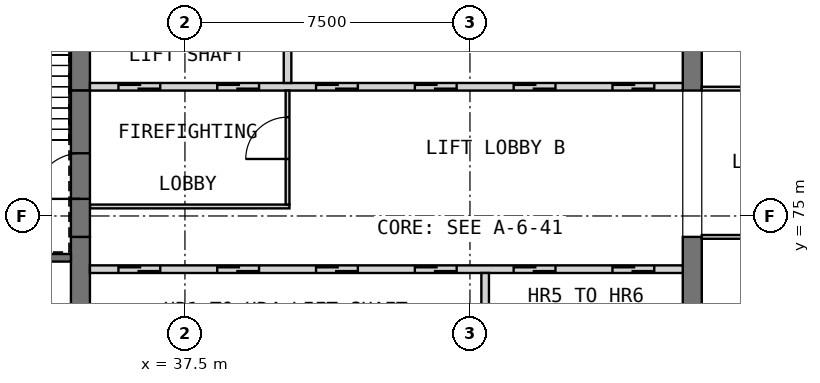
"""IFC4 building model, lengths in metres.
Left out: names, types, materials, properties, quantities, classifications, styles, units other than length and angle.
Written with IfcOpenShell. Run it as: python <this file> out.ifc"""

import sys

from ifc_helpers import new_model, si_unit, direction, frame, frame_2d, origin, place, context, subcontext, project, spatial, rectangle, extrude, element, fill, save


model = new_model("IFC4")
c1 = context("Model", 3, precision=1e-05, world=origin(), true_north=direction((0.0, 1.0)))
c2 = subcontext(c1, "Body", "Model", "MODEL_VIEW")
j1 = project(units=[si_unit("LENGTHUNIT", "METRE"), si_unit("PLANEANGLEUNIT", "RADIAN")], contexts=[c1])
p1 = place(None, origin())
s1 = spatial("IfcSite", under=j1, at=p1, CompositionType="ELEMENT")
p2 = place(p1, origin())
s2 = spatial("IfcBuilding", under=s1, at=p2, CompositionType="ELEMENT")
p3 = place(p2, frame((0.0, 0.0, 302.7)))
s3 = spatial("IfcBuildingStorey", under=s2, at=p3, CompositionType="ELEMENT", Elevation=302.7)
p4 = place(p3, frame((34.75, 68.05, 0.0), z_axis=(0.0, 0.0, 1.0), x_axis=(0.0, 1.0, 0.0)))
e1 = element("IfcWall", 1, at=p4, inside=s3, PredefinedType="SHEAR", context=c2, shape_type="SweptSolid", body=[
    extrude(rectangle(XDim=6.4, YDim=0.5, at=frame_2d((3.2, 0.0))), origin(), (0.0, 0.0, 1.0), 6.0),
])
p5 = place(p3, frame((34.75, 78.3, 0.0), z_axis=(0.0, 0.0, 1.0), x_axis=(0.0, 1.0, 0.0)))
e2 = element("IfcWall", 2, at=p5, inside=s3, PredefinedType="SHEAR", context=c2, shape_type="SweptSolid", body=[
    extrude(rectangle(XDim=3.6, YDim=0.5, at=frame_2d((1.8, 0.0))), origin(), (0.0, 0.0, 1.0), 6.0),
])
p6 = place(p3, frame((50.85, 68.05, 0.0), z_axis=(0.0, 0.0, 1.0), x_axis=(0.0, 1.0, 0.0)))
e3 = element("IfcWall", 3, at=p6, inside=s3, PredefinedType="SHEAR", context=c2, shape_type="SweptSolid", body=[
    extrude(rectangle(XDim=6.4, YDim=0.5, at=frame_2d((3.2, 0.0))), origin(), (0.0, 0.0, 1.0), 6.0),
])
p7 = place(p3, frame((50.85, 78.3, 0.0), z_axis=(0.0, 0.0, 1.0), x_axis=(0.0, 1.0, 0.0)))
e4 = element("IfcWall", 4, at=p7, inside=s3, PredefinedType="SHEAR", context=c2, shape_type="SweptSolid", body=[
    extrude(rectangle(XDim=3.6, YDim=0.5, at=frame_2d((1.8, 0.0))), origin(), (0.0, 0.0, 1.0), 6.0),
])
p8 = place(p3, frame((35.0, 73.6, 0.0), z_axis=(0.0, 0.0, 1.0), x_axis=(1.0, 0.0, 0.0)))
e5 = element("IfcWall", 5, at=p8, inside=s3, PredefinedType="SOLIDWALL", context=c2, shape_type="SweptSolid", body=[
    extrude(rectangle(XDim=15.6, YDim=0.2, at=frame_2d((7.8, 0.0))), origin(), (0.0, 0.0, 1.0), 6.0),
])
p9 = place(p8, frame((0.75, 0.0, 0.0)))
e6 = element("IfcOpeningElement", 6, at=p9, cuts=e5, PredefinedType="OPENING", context=c2, shape_type="SweptSolid", body=[
    extrude(rectangle(XDim=1.1, YDim=2.1, at=frame_2d((0.55, 1.05))), frame((0.0, 0.11, 0.0), z_axis=(0.0, -1.0, 0.0), x_axis=(1.0, 0.0, 0.0)), (0.0, 0.0, 1.0), 0.22),
])
p10 = place(p8, frame((3.35, 0.0, 0.0)))
e7 = element("IfcOpeningElement", 7, at=p10, cuts=e5, PredefinedType="OPENING", context=c2, shape_type="SweptSolid", body=[
    extrude(rectangle(XDim=1.1, YDim=2.1, at=frame_2d((0.55, 1.05))), frame((0.0, 0.11, 0.0), z_axis=(0.0, -1.0, 0.0), x_axis=(1.0, 0.0, 0.0)), (0.0, 0.0, 1.0), 0.22),
])
p11 = place(p8, frame((5.95, 0.0, 0.0)))
e8 = element("IfcOpeningElement", 8, at=p11, cuts=e5, PredefinedType="OPENING", context=c2, shape_type="SweptSolid", body=[
    extrude(rectangle(XDim=1.1, YDim=2.1, at=frame_2d((0.55, 1.05))), frame((0.0, 0.11, 0.0), z_axis=(0.0, -1.0, 0.0), x_axis=(1.0, 0.0, 0.0)), (0.0, 0.0, 1.0), 0.22),
])
p12 = place(p8, frame((8.55, 0.0, 0.0)))
e9 = element("IfcOpeningElement", 9, at=p12, cuts=e5, PredefinedType="OPENING", context=c2, shape_type="SweptSolid", body=[
    extrude(rectangle(XDim=1.1, YDim=2.1, at=frame_2d((0.55, 1.05))), frame((0.0, 0.11, 0.0), z_axis=(0.0, -1.0, 0.0), x_axis=(1.0, 0.0, 0.0)), (0.0, 0.0, 1.0), 0.22),
])
p13 = place(p8, frame((11.15, 0.0, 0.0)))
e10 = element("IfcOpeningElement", 10, at=p13, cuts=e5, PredefinedType="OPENING", context=c2, shape_type="SweptSolid", body=[
    extrude(rectangle(XDim=1.1, YDim=2.1, at=frame_2d((0.55, 1.05))), frame((0.0, 0.11, 0.0), z_axis=(0.0, -1.0, 0.0), x_axis=(1.0, 0.0, 0.0)), (0.0, 0.0, 1.0), 0.22),
])
p14 = place(p8, frame((13.75, 0.0, 0.0)))
e11 = element("IfcOpeningElement", 11, at=p14, cuts=e5, PredefinedType="OPENING", context=c2, shape_type="SweptSolid", body=[
    extrude(rectangle(XDim=1.1, YDim=2.1, at=frame_2d((0.55, 1.05))), frame((0.0, 0.11, 0.0), z_axis=(0.0, -1.0, 0.0), x_axis=(1.0, 0.0, 0.0)), (0.0, 0.0, 1.0), 0.22),
])
p15 = place(p3, frame((45.4, 71.5, 0.0), z_axis=(0.0, 0.0, 1.0), x_axis=(0.0, 1.0, 0.0)))
e12 = element("IfcWall", 12, at=p15, inside=s3, PredefinedType="SOLIDWALL", context=c2, shape_type="SweptSolid", body=[
    extrude(rectangle(XDim=2.0, YDim=0.2, at=frame_2d((1.0, 0.0))), origin(), (0.0, 0.0, 1.0), 6.0),
])
p16 = place(p3, frame((35.0, 78.4, 0.0), z_axis=(0.0, 0.0, 1.0), x_axis=(1.0, 0.0, 0.0)))
e13 = element("IfcWall", 13, at=p16, inside=s3, PredefinedType="SOLIDWALL", context=c2, shape_type="SweptSolid", body=[
    extrude(rectangle(XDim=15.6, YDim=0.2, at=frame_2d((7.8, 0.0))), origin(), (0.0, 0.0, 1.0), 6.0),
])
p17 = place(p16, frame((0.75, 0.0, 0.0)))
e14 = element("IfcOpeningElement", 14, at=p17, cuts=e13, PredefinedType="OPENING", context=c2, shape_type="SweptSolid", body=[
    extrude(rectangle(XDim=1.1, YDim=2.1, at=frame_2d((0.55, 1.05))), frame((0.0, 0.11, 0.0), z_axis=(0.0, -1.0, 0.0), x_axis=(1.0, 0.0, 0.0)), (0.0, 0.0, 1.0), 0.22),
])
p18 = place(p16, frame((3.35, 0.0, 0.0)))
e15 = element("IfcOpeningElement", 15, at=p18, cuts=e13, PredefinedType="OPENING", context=c2, shape_type="SweptSolid", body=[
    extrude(rectangle(XDim=1.1, YDim=2.1, at=frame_2d((0.55, 1.05))), frame((0.0, 0.11, 0.0), z_axis=(0.0, -1.0, 0.0), x_axis=(1.0, 0.0, 0.0)), (0.0, 0.0, 1.0), 0.22),
])
p19 = place(p16, frame((5.95, 0.0, 0.0)))
e16 = element("IfcOpeningElement", 16, at=p19, cuts=e13, PredefinedType="OPENING", context=c2, shape_type="SweptSolid", body=[
    extrude(rectangle(XDim=1.1, YDim=2.1, at=frame_2d((0.55, 1.05))), frame((0.0, 0.11, 0.0), z_axis=(0.0, -1.0, 0.0), x_axis=(1.0, 0.0, 0.0)), (0.0, 0.0, 1.0), 0.22),
])
p20 = place(p16, frame((8.55, 0.0, 0.0)))
e17 = element("IfcOpeningElement", 17, at=p20, cuts=e13, PredefinedType="OPENING", context=c2, shape_type="SweptSolid", body=[
    extrude(rectangle(XDim=1.1, YDim=2.1, at=frame_2d((0.55, 1.05))), frame((0.0, 0.11, 0.0), z_axis=(0.0, -1.0, 0.0), x_axis=(1.0, 0.0, 0.0)), (0.0, 0.0, 1.0), 0.22),
])
p21 = place(p16, frame((11.15, 0.0, 0.0)))
e18 = element("IfcOpeningElement", 18, at=p21, cuts=e13, PredefinedType="OPENING", context=c2, shape_type="SweptSolid", body=[
    extrude(rectangle(XDim=1.1, YDim=2.1, at=frame_2d((0.55, 1.05))), frame((0.0, 0.11, 0.0), z_axis=(0.0, -1.0, 0.0), x_axis=(1.0, 0.0, 0.0)), (0.0, 0.0, 1.0), 0.22),
])
p22 = place(p16, frame((13.75, 0.0, 0.0)))
e19 = element("IfcOpeningElement", 19, at=p22, cuts=e13, PredefinedType="OPENING", context=c2, shape_type="SweptSolid", body=[
    extrude(rectangle(XDim=1.1, YDim=2.1, at=frame_2d((0.55, 1.05))), frame((0.0, 0.11, 0.0), z_axis=(0.0, -1.0, 0.0), x_axis=(1.0, 0.0, 0.0)), (0.0, 0.0, 1.0), 0.22),
])
p23 = place(p3, frame((40.2, 78.5, 0.0), z_axis=(0.0, 0.0, 1.0), x_axis=(0.0, 1.0, 0.0)))
e20 = element("IfcWall", 20, at=p23, inside=s3, PredefinedType="SOLIDWALL", context=c2, shape_type="SweptSolid", body=[
    extrude(rectangle(XDim=3.4, YDim=0.2, at=frame_2d((1.7, 0.0))), origin(), (0.0, 0.0, 1.0), 6.0),
])
p24 = place(p3, frame((35.0, 75.25, 0.0), z_axis=(0.0, 0.0, 1.0), x_axis=(1.0, 0.0, 0.0)))
e21 = element("IfcWall", 21, at=p24, inside=s3, PredefinedType="PARTITIONING", context=c2, shape_type="SweptSolid", body=[
    extrude(rectangle(XDim=5.25, YDim=0.1, at=frame_2d((2.625, 0.0))), origin(), (0.0, 0.0, 1.0), 5.7),
])
p25 = place(p3, frame((40.2, 75.3, 0.0), z_axis=(0.0, 0.0, 1.0), x_axis=(0.0, 1.0, 0.0)))
e22 = element("IfcWall", 22, at=p25, inside=s3, PredefinedType="PARTITIONING", context=c2, shape_type="SweptSolid", body=[
    extrude(rectangle(XDim=3.0, YDim=0.1, at=frame_2d((1.5, 0.0))), origin(), (0.0, 0.0, 1.0), 5.7),
])
p26 = place(p25, frame((1.2, 0.0, 0.0)))
e23 = element("IfcOpeningElement", 23, at=p26, cuts=e22, PredefinedType="OPENING", context=c2, shape_type="SweptSolid", body=[
    extrude(rectangle(XDim=1.1, YDim=2.1, at=frame_2d((0.55, 1.05))), frame((0.0, 0.06, 0.0), z_axis=(0.0, -1.0, 0.0), x_axis=(1.0, 0.0, 0.0)), (0.0, 0.0, 1.0), 0.12),
])
p27 = place(p3, frame((34.75, 74.45, 0.0), z_axis=(0.0, 0.0, 1.0), x_axis=(0.0, 1.0, 0.0)))
e24 = element("IfcWall", 24, at=p27, inside=s3, PredefinedType="SOLIDWALL", context=c2, shape_type="SweptSolid", body=[
    extrude(rectangle(XDim=3.85, YDim=0.5, at=frame_2d((1.925, 0.0))), origin(), (0.0, 0.0, 1.0), 4.8),
])
p28 = place(p27, frame((1.0, 0.0, 0.0)))
e25 = element("IfcOpeningElement", 25, at=p28, cuts=e24, PredefinedType="OPENING", context=c2, shape_type="SweptSolid", body=[
    extrude(rectangle(XDim=1.2, YDim=2.1, at=frame_2d((0.6, 1.05))), frame((0.0, 0.26, 0.0), z_axis=(0.0, -1.0, 0.0), x_axis=(1.0, 0.0, 0.0)), (0.0, 0.0, 1.0), 0.52),
])
p29 = place(p3, frame((30.6, 73.9, 0.0), z_axis=(0.0, 0.0, 1.0), x_axis=(1.0, 0.0, 0.0)))
e26 = element("IfcWall", 26, at=p29, inside=s3, PredefinedType="SOLIDWALL", context=c2, shape_type="SweptSolid", body=[
    extrude(rectangle(XDim=3.9, YDim=0.2, at=frame_2d((1.95, 0.0))), origin(), (0.0, 0.0, 1.0), 5.7),
])
p30 = place(p29, frame((1.7, 0.0, 0.0)))
e27 = element("IfcOpeningElement", 27, at=p30, cuts=e26, PredefinedType="OPENING", context=c2, shape_type="SweptSolid", body=[
    extrude(rectangle(XDim=0.9, YDim=2.1, at=frame_2d((0.45, 1.05))), frame((0.0, 0.11, 0.0), z_axis=(0.0, -1.0, 0.0), x_axis=(1.0, 0.0, 0.0)), (0.0, 0.0, 1.0), 0.22),
])
p31 = place(p3, frame((51.1, 74.45, 0.0), z_axis=(0.0, 0.0, 1.0), x_axis=(1.0, 0.0, 0.0)))
e28 = element("IfcWall", 28, at=p31, inside=s3, PredefinedType="PARTITIONING", context=c2, shape_type="SweptSolid", body=[
    extrude(rectangle(XDim=8.3, YDim=0.1, at=frame_2d((4.15, 0.0))), origin(), (0.0, 0.0, 1.0), 5.7),
])
p32 = place(p31, frame((3.7, 0.0, 0.0)))
e29 = element("IfcOpeningElement", 29, at=p32, cuts=e28, PredefinedType="OPENING", context=c2, shape_type="SweptSolid", body=[
    extrude(rectangle(XDim=0.9, YDim=2.1, at=frame_2d((0.45, 1.05))), frame((0.0, 0.06, 0.0), z_axis=(0.0, -1.0, 0.0), x_axis=(1.0, 0.0, 0.0)), (0.0, 0.0, 1.0), 0.12),
])
p33 = place(p3, frame((51.1, 78.35, 0.0), z_axis=(0.0, 0.0, 1.0), x_axis=(1.0, 0.0, 0.0)))
e30 = element("IfcWall", 30, at=p33, inside=s3, PredefinedType="PARTITIONING", context=c2, shape_type="SweptSolid", body=[
    extrude(rectangle(XDim=8.3, YDim=0.1, at=frame_2d((4.15, 0.0))), origin(), (0.0, 0.0, 1.0), 5.7),
])
p34 = place(p33, frame((3.7, 0.0, 0.0)))
e31 = element("IfcOpeningElement", 31, at=p34, cuts=e30, PredefinedType="OPENING", context=c2, shape_type="SweptSolid", body=[
    extrude(rectangle(XDim=0.9, YDim=2.1, at=frame_2d((0.45, 1.05))), frame((0.0, 0.06, 0.0), z_axis=(0.0, -1.0, 0.0), x_axis=(1.0, 0.0, 0.0)), (0.0, 0.0, 1.0), 0.12),
])
p35 = place(p9, origin())
e32 = element("IfcDoor", 32, at=p35, inside=s3, OperationType="DOUBLE_DOOR_SLIDING", PredefinedType="DOOR", context=c2, shape_type="SweptSolid", body=[
    extrude(rectangle(XDim=1.1, YDim=2.1, at=frame_2d((0.55, 1.05))), frame((0.0, 0.025, 0.0), z_axis=(0.0, -1.0, 0.0), x_axis=(1.0, 0.0, 0.0)), (0.0, 0.0, 1.0), 0.05),
])
fill(e6, e32)
p36 = place(p10, origin())
e33 = element("IfcDoor", 33, at=p36, inside=s3, OperationType="DOUBLE_DOOR_SLIDING", PredefinedType="DOOR", context=c2, shape_type="SweptSolid", body=[
    extrude(rectangle(XDim=1.1, YDim=2.1, at=frame_2d((0.55, 1.05))), frame((0.0, 0.025, 0.0), z_axis=(0.0, -1.0, 0.0), x_axis=(1.0, 0.0, 0.0)), (0.0, 0.0, 1.0), 0.05),
])
fill(e7, e33)
p37 = place(p11, origin())
e34 = element("IfcDoor", 34, at=p37, inside=s3, OperationType="DOUBLE_DOOR_SLIDING", PredefinedType="DOOR", context=c2, shape_type="SweptSolid", body=[
    extrude(rectangle(XDim=1.1, YDim=2.1, at=frame_2d((0.55, 1.05))), frame((0.0, 0.025, 0.0), z_axis=(0.0, -1.0, 0.0), x_axis=(1.0, 0.0, 0.0)), (0.0, 0.0, 1.0), 0.05),
])
fill(e8, e34)
p38 = place(p12, origin())
e35 = element("IfcDoor", 35, at=p38, inside=s3, OperationType="DOUBLE_DOOR_SLIDING", PredefinedType="DOOR", context=c2, shape_type="SweptSolid", body=[
    extrude(rectangle(XDim=1.1, YDim=2.1, at=frame_2d((0.55, 1.05))), frame((0.0, 0.025, 0.0), z_axis=(0.0, -1.0, 0.0), x_axis=(1.0, 0.0, 0.0)), (0.0, 0.0, 1.0), 0.05),
])
fill(e9, e35)
p39 = place(p13, origin())
e36 = element("IfcDoor", 36, at=p39, inside=s3, OperationType="DOUBLE_DOOR_SLIDING", PredefinedType="DOOR", context=c2, shape_type="SweptSolid", body=[
    extrude(rectangle(XDim=1.1, YDim=2.1, at=frame_2d((0.55, 1.05))), frame((0.0, 0.025, 0.0), z_axis=(0.0, -1.0, 0.0), x_axis=(1.0, 0.0, 0.0)), (0.0, 0.0, 1.0), 0.05),
])
fill(e10, e36)
p40 = place(p14, origin())
e37 = element("IfcDoor", 37, at=p40, inside=s3, OperationType="DOUBLE_DOOR_SLIDING", PredefinedType="DOOR", context=c2, shape_type="SweptSolid", body=[
    extrude(rectangle(XDim=1.1, YDim=2.1, at=frame_2d((0.55, 1.05))), frame((0.0, 0.025, 0.0), z_axis=(0.0, -1.0, 0.0), x_axis=(1.0, 0.0, 0.0)), (0.0, 0.0, 1.0), 0.05),
])
fill(e11, e37)
p41 = place(p17, origin())
e38 = element("IfcDoor", 38, at=p41, inside=s3, OperationType="DOUBLE_DOOR_SLIDING", PredefinedType="DOOR", context=c2, shape_type="SweptSolid", body=[
    extrude(rectangle(XDim=1.1, YDim=2.1, at=frame_2d((0.55, 1.05))), frame((0.0, 0.025, 0.0), z_axis=(0.0, -1.0, 0.0), x_axis=(1.0, 0.0, 0.0)), (0.0, 0.0, 1.0), 0.05),
])
fill(e14, e38)
p42 = place(p18, origin())
e39 = element("IfcDoor", 39, at=p42, inside=s3, OperationType="DOUBLE_DOOR_SLIDING", PredefinedType="DOOR", context=c2, shape_type="SweptSolid", body=[
    extrude(rectangle(XDim=1.1, YDim=2.1, at=frame_2d((0.55, 1.05))), frame((0.0, 0.025, 0.0), z_axis=(0.0, -1.0, 0.0), x_axis=(1.0, 0.0, 0.0)), (0.0, 0.0, 1.0), 0.05),
])
fill(e15, e39)
p43 = place(p19, origin())
e40 = element("IfcDoor", 40, at=p43, inside=s3, OperationType="DOUBLE_DOOR_SLIDING", PredefinedType="DOOR", context=c2, shape_type="SweptSolid", body=[
    extrude(rectangle(XDim=1.1, YDim=2.1, at=frame_2d((0.55, 1.05))), frame((0.0, 0.025, 0.0), z_axis=(0.0, -1.0, 0.0), x_axis=(1.0, 0.0, 0.0)), (0.0, 0.0, 1.0), 0.05),
])
fill(e16, e40)
p44 = place(p20, origin())
e41 = element("IfcDoor", 41, at=p44, inside=s3, OperationType="DOUBLE_DOOR_SLIDING", PredefinedType="DOOR", context=c2, shape_type="SweptSolid", body=[
    extrude(rectangle(XDim=1.1, YDim=2.1, at=frame_2d((0.55, 1.05))), frame((0.0, 0.025, 0.0), z_axis=(0.0, -1.0, 0.0), x_axis=(1.0, 0.0, 0.0)), (0.0, 0.0, 1.0), 0.05),
])
fill(e17, e41)
p45 = place(p21, origin())
e42 = element("IfcDoor", 42, at=p45, inside=s3, OperationType="DOUBLE_DOOR_SLIDING", PredefinedType="DOOR", context=c2, shape_type="SweptSolid", body=[
    extrude(rectangle(XDim=1.1, YDim=2.1, at=frame_2d((0.55, 1.05))), frame((0.0, 0.025, 0.0), z_axis=(0.0, -1.0, 0.0), x_axis=(1.0, 0.0, 0.0)), (0.0, 0.0, 1.0), 0.05),
])
fill(e18, e42)
p46 = place(p22, origin())
e43 = element("IfcDoor", 43, at=p46, inside=s3, OperationType="DOUBLE_DOOR_SLIDING", PredefinedType="DOOR", context=c2, shape_type="SweptSolid", body=[
    extrude(rectangle(XDim=1.1, YDim=2.1, at=frame_2d((0.55, 1.05))), frame((0.0, 0.025, 0.0), z_axis=(0.0, -1.0, 0.0), x_axis=(1.0, 0.0, 0.0)), (0.0, 0.0, 1.0), 0.05),
])
fill(e19, e43)
p47 = place(p26, origin())
e44 = element("IfcDoor", 44, at=p47, inside=s3, OperationType="SINGLE_SWING_LEFT", PredefinedType="DOOR", context=c2, shape_type="SweptSolid", body=[
    extrude(rectangle(XDim=1.1, YDim=2.1, at=frame_2d((0.55, 1.05))), frame((0.0, 0.025, 0.0), z_axis=(0.0, -1.0, 0.0), x_axis=(1.0, 0.0, 0.0)), (0.0, 0.0, 1.0), 0.05),
])
fill(e23, e44)
p48 = place(p28, origin())
e45 = element("IfcDoor", 45, at=p48, inside=s3, OperationType="SINGLE_SWING_RIGHT", PredefinedType="DOOR", context=c2, shape_type="SweptSolid", body=[
    extrude(rectangle(XDim=1.2, YDim=2.1, at=frame_2d((0.6, 1.05))), frame((0.0, 0.025, 0.0), z_axis=(0.0, -1.0, 0.0), x_axis=(1.0, 0.0, 0.0)), (0.0, 0.0, 1.0), 0.05),
])
fill(e25, e45)
save(model, sys.argv[1])
